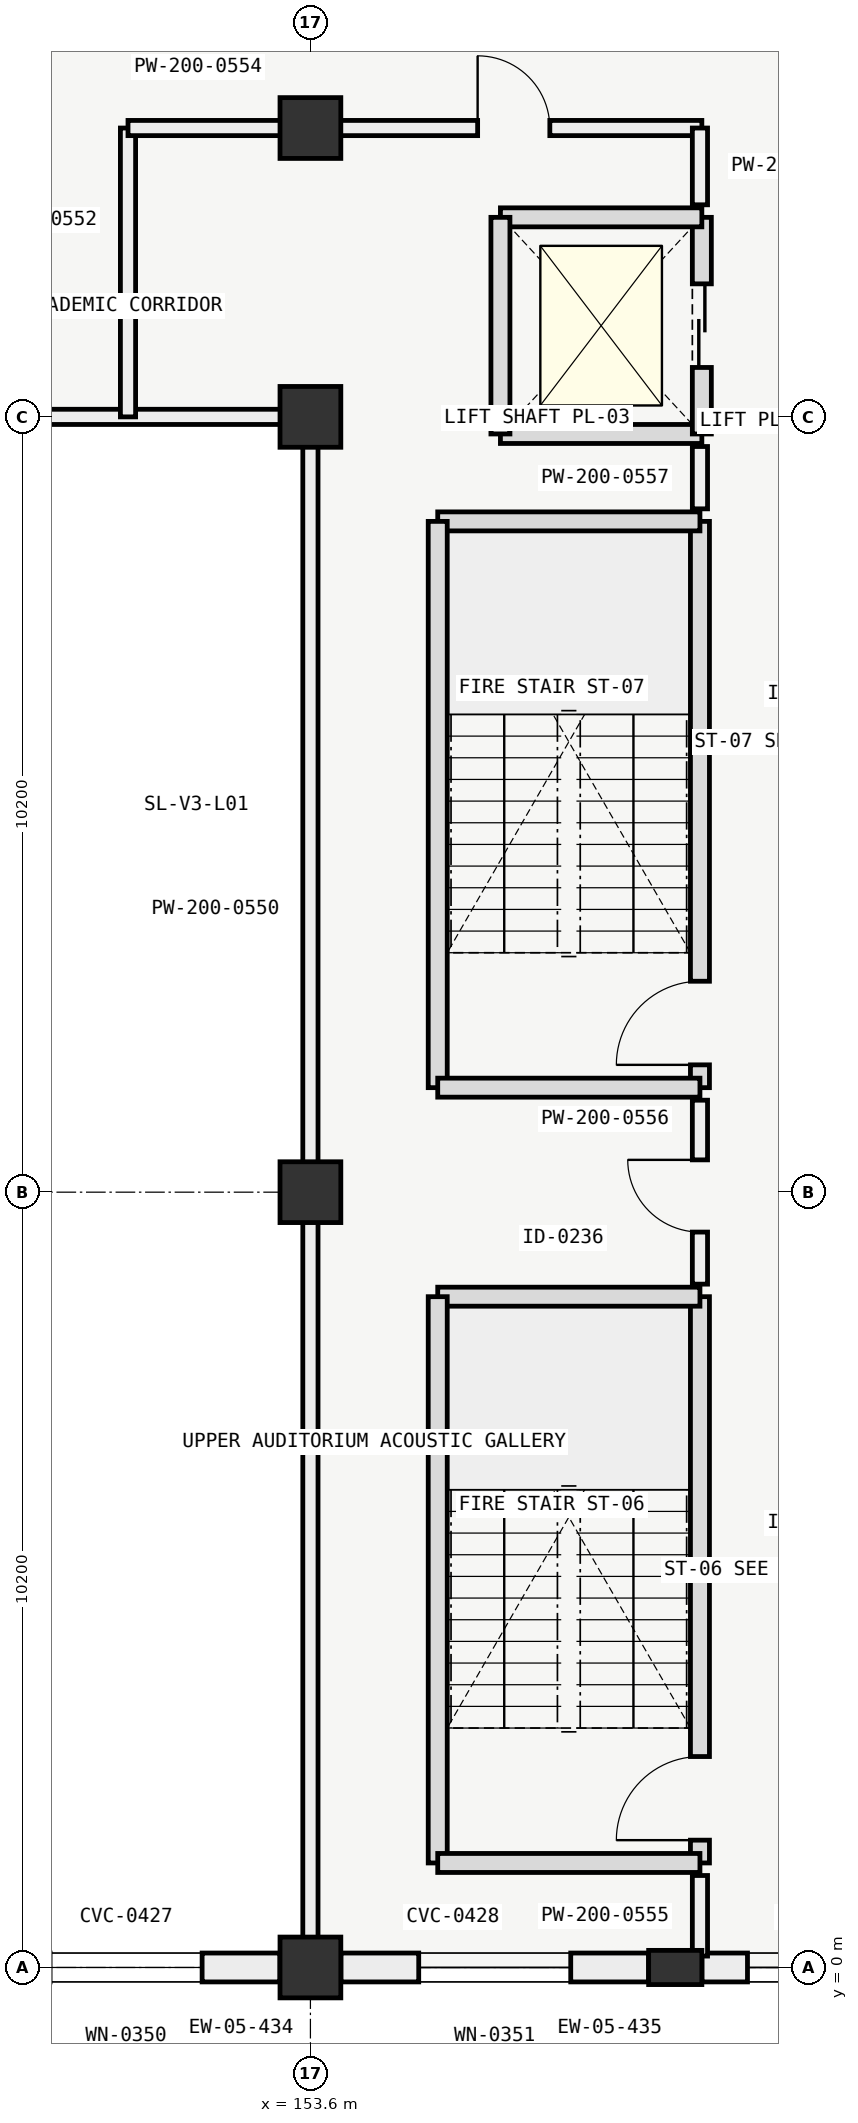
"""IFC4 building model, lengths in metres.
Left out: names, types, materials, properties, quantities, classifications, styles, units other than length and angle.
Written with IfcOpenShell. Run it as: python <this file> out.ifc"""

import sys

from ifc_helpers import new_model, si_unit, direction, frame, frame_2d, origin, origin_2d, place, context, subcontext, project, spatial, rectangle, extrude, element, fill, save


model = new_model("IFC4")
c1 = context("Model", 3, precision=1e-05, world=origin(), true_north=direction((0.0, 1.0)))
c2 = subcontext(c1, "Body", "Model", "MODEL_VIEW")
j1 = project(units=[si_unit("LENGTHUNIT", "METRE"), si_unit("PLANEANGLEUNIT", "RADIAN")], contexts=[c1])
p1 = place(None, origin())
s1 = spatial("IfcSite", under=j1, at=p1, CompositionType="ELEMENT")
p2 = place(p1, origin())
s2 = spatial("IfcBuilding", under=s1, at=p2, CompositionType="ELEMENT")
p3 = place(p2, frame((0.0, 0.0, 5.4)))
s3 = spatial("IfcBuildingStorey", under=s2, at=p3, CompositionType="ELEMENT", Elevation=5.4)
for number, where, z_axis, x_axis in (
    (1, (153.6, 0.0, 0.0), (0.0, 0.0, 1.0), (1.0, 0.0, 0.0)),
    (2, (153.6, 10.2, 0.0), (0.0, 0.0, 1.0), (1.0, 0.0, 0.0)),
    (3, (153.6, 20.4, 0.0), (0.0, 0.0, 1.0), (1.0, 0.0, 0.0)),
    (4, (153.6, 24.2, 0.0), (0.0, 0.0, 1.0), (1.0, 0.0, 0.0)),
):
    element("IfcColumn", number, at=place(p3, frame(where, z_axis=z_axis, x_axis=x_axis)), inside=s3, PredefinedType="COLUMN", context=c2, shape_type="SweptSolid", body=[
        extrude(rectangle(XDim=0.8, YDim=0.8, at=origin_2d()), origin(), (0.0, 0.0, 1.0), 4.2),
    ])
p4 = place(p3, frame((158.4, 0.0, 0.0), z_axis=(0.0, 0.0, 1.0), x_axis=(0.0, 1.0, 0.0)))
e5 = element("IfcColumn", 5, at=p4, inside=s3, PredefinedType="PILASTER", context=c2, shape_type="SweptSolid", body=[
    extrude(rectangle(XDim=0.45, YDim=0.7, at=origin_2d()), origin(), (0.0, 0.0, 1.0), 4.2),
])
p5 = place(p3, frame((153.199, 0.0, 0.0), z_axis=(0.0, 0.0, 1.0), x_axis=(-1.0, 0.0, 0.0)))
e6 = element("IfcWall", 6, at=p5, inside=s3, PredefinedType="SOLIDWALL", context=c2, shape_type="SweptSolid", body=[
    extrude(rectangle(XDim=4.048, YDim=0.38, at=frame_2d((2.024, 0.0))), origin(), (0.0, 0.0, 1.0), 3.25),
])
p6 = place(p5, frame((1.024, 0.0, 0.85)))
e7 = element("IfcOpeningElement", 7, at=p6, cuts=e6, PredefinedType="OPENING", context=c2, shape_type="SweptSolid", body=[
    extrude(rectangle(XDim=2.0, YDim=1.35, at=frame_2d((1.0, 0.675))), frame((0.0, 0.2, 0.0), z_axis=(0.0, -1.0, 0.0), x_axis=(1.0, 0.0, 0.0)), (0.0, 0.0, 1.0), 0.4),
])
p7 = place(p3, frame((158.049, 0.0, 0.0), z_axis=(0.0, 0.0, 1.0), x_axis=(-1.0, 0.0, 0.0)))
e8 = element("IfcWall", 8, at=p7, inside=s3, PredefinedType="SOLIDWALL", context=c2, shape_type="SweptSolid", body=[
    extrude(rectangle(XDim=4.048, YDim=0.38, at=frame_2d((2.024, 0.0))), origin(), (0.0, 0.0, 1.0), 3.25),
])
p8 = place(p7, frame((1.024, 0.0, 0.85)))
e9 = element("IfcOpeningElement", 9, at=p8, cuts=e8, PredefinedType="OPENING", context=c2, shape_type="SweptSolid", body=[
    extrude(rectangle(XDim=2.0, YDim=1.35, at=frame_2d((1.0, 0.675))), frame((0.0, 0.2, 0.0), z_axis=(0.0, -1.0, 0.0), x_axis=(1.0, 0.0, 0.0)), (0.0, 0.0, 1.0), 0.4),
])
p9 = place(p3, frame((161.95, 0.0, 0.0), z_axis=(0.0, 0.0, 1.0), x_axis=(-1.0, 0.0, 0.0)))
e10 = element("IfcWall", 10, at=p9, inside=s3, PredefinedType="SOLIDWALL", context=c2, shape_type="SweptSolid", body=[
    extrude(rectangle(XDim=3.199, YDim=0.38, at=frame_2d((1.6, 0.0))), origin(), (0.0, 0.0, 1.0), 3.25),
])
p10 = place(p9, frame((0.6, 0.0, 0.75)))
e11 = element("IfcOpeningElement", 11, at=p10, cuts=e10, PredefinedType="OPENING", context=c2, shape_type="SweptSolid", body=[
    extrude(rectangle(XDim=2.0, YDim=1.35, at=frame_2d((1.0, 0.675))), frame((0.0, 0.2, 0.0), z_axis=(0.0, -1.0, 0.0), x_axis=(1.0, 0.0, 0.0)), (0.0, 0.0, 1.0), 0.4),
])
p11 = place(p3, frame((158.725, 1.375, 0.0), z_axis=(0.0, 0.0, 1.0), x_axis=(0.0, 1.0, 0.0)))
e12 = element("IfcWall", 12, at=p11, inside=s3, PredefinedType="SOLIDWALL", context=c2, shape_type="SweptSolid", body=[
    extrude(rectangle(XDim=7.45, YDim=0.25, at=frame_2d((3.725, 0.0))), origin(), (0.0, 0.0, 1.0), 3.92),
])
p12 = place(p11, frame((0.3, 0.0, 0.0)))
e13 = element("IfcOpeningElement", 13, at=p12, cuts=e12, PredefinedType="OPENING", context=c2, shape_type="SweptSolid", body=[
    extrude(rectangle(XDim=1.1, YDim=2.2, at=frame_2d((0.55, 1.1))), frame((0.0, 0.135, 0.0), z_axis=(0.0, -1.0, 0.0), x_axis=(1.0, 0.0, 0.0)), (0.0, 0.0, 1.0), 0.27),
])
p13 = place(p3, frame((158.725, 8.825, 0.0), z_axis=(0.0, 0.0, 1.0), x_axis=(-1.0, 0.0, 0.0)))
e14 = element("IfcWall", 14, at=p13, inside=s3, PredefinedType="SOLIDWALL", context=c2, shape_type="SweptSolid", body=[
    extrude(rectangle(XDim=3.45, YDim=0.25, at=frame_2d((1.725, 0.0))), origin(), (0.0, 0.0, 1.0), 3.92),
])
p14 = place(p3, frame((155.275, 8.825, 0.0), z_axis=(0.0, 0.0, 1.0), x_axis=(0.0, -1.0, 0.0)))
e15 = element("IfcWall", 15, at=p14, inside=s3, PredefinedType="SOLIDWALL", context=c2, shape_type="SweptSolid", body=[
    extrude(rectangle(XDim=7.45, YDim=0.25, at=frame_2d((3.725, 0.0))), origin(), (0.0, 0.0, 1.0), 3.92),
])
p15 = place(p3, frame((155.275, 1.375, 0.0), z_axis=(0.0, 0.0, 1.0), x_axis=(1.0, 0.0, 0.0)))
e16 = element("IfcWall", 16, at=p15, inside=s3, PredefinedType="SOLIDWALL", context=c2, shape_type="SweptSolid", body=[
    extrude(rectangle(XDim=3.45, YDim=0.25, at=frame_2d((1.725, 0.0))), origin(), (0.0, 0.0, 1.0), 3.92),
])
p16 = place(p3, frame((158.725, 11.575, 0.0), z_axis=(0.0, 0.0, 1.0), x_axis=(0.0, 1.0, 0.0)))
e17 = element("IfcWall", 17, at=p16, inside=s3, PredefinedType="SOLIDWALL", context=c2, shape_type="SweptSolid", body=[
    extrude(rectangle(XDim=7.45, YDim=0.25, at=frame_2d((3.725, 0.0))), origin(), (0.0, 0.0, 1.0), 3.92),
])
p17 = place(p16, frame((0.3, 0.0, 0.0)))
e18 = element("IfcOpeningElement", 18, at=p17, cuts=e17, PredefinedType="OPENING", context=c2, shape_type="SweptSolid", body=[
    extrude(rectangle(XDim=1.1, YDim=2.2, at=frame_2d((0.55, 1.1))), frame((0.0, 0.135, 0.0), z_axis=(0.0, -1.0, 0.0), x_axis=(1.0, 0.0, 0.0)), (0.0, 0.0, 1.0), 0.27),
])
p18 = place(p3, frame((158.725, 19.025, 0.0), z_axis=(0.0, 0.0, 1.0), x_axis=(-1.0, 0.0, 0.0)))
e19 = element("IfcWall", 19, at=p18, inside=s3, PredefinedType="SOLIDWALL", context=c2, shape_type="SweptSolid", body=[
    extrude(rectangle(XDim=3.45, YDim=0.25, at=frame_2d((1.725, 0.0))), origin(), (0.0, 0.0, 1.0), 3.92),
])
p19 = place(p3, frame((155.275, 19.025, 0.0), z_axis=(0.0, 0.0, 1.0), x_axis=(0.0, -1.0, 0.0)))
e20 = element("IfcWall", 20, at=p19, inside=s3, PredefinedType="SOLIDWALL", context=c2, shape_type="SweptSolid", body=[
    extrude(rectangle(XDim=7.45, YDim=0.25, at=frame_2d((3.725, 0.0))), origin(), (0.0, 0.0, 1.0), 3.92),
])
p20 = place(p3, frame((155.275, 11.575, 0.0), z_axis=(0.0, 0.0, 1.0), x_axis=(1.0, 0.0, 0.0)))
e21 = element("IfcWall", 21, at=p20, inside=s3, PredefinedType="SOLIDWALL", context=c2, shape_type="SweptSolid", body=[
    extrude(rectangle(XDim=3.45, YDim=0.25, at=frame_2d((1.725, 0.0))), origin(), (0.0, 0.0, 1.0), 3.92),
])
p21 = place(p3, frame((156.1, 20.175, 0.0), z_axis=(0.0, 0.0, 1.0), x_axis=(1.0, 0.0, 0.0)))
e22 = element("IfcWall", 22, at=p21, inside=s3, PredefinedType="SOLIDWALL", context=c2, shape_type="SweptSolid", body=[
    extrude(rectangle(XDim=2.65, YDim=0.25, at=frame_2d((1.325, 0.0))), origin(), (0.0, 0.0, 1.0), 3.92),
])
p22 = place(p3, frame((158.75, 20.175, 0.0), z_axis=(0.0, 0.0, 1.0), x_axis=(0.0, 1.0, 0.0)))
e23 = element("IfcWall", 23, at=p22, inside=s3, PredefinedType="SOLIDWALL", context=c2, shape_type="SweptSolid", body=[
    extrude(rectangle(XDim=2.85, YDim=0.25, at=frame_2d((1.425, 0.0))), origin(), (0.0, 0.0, 1.0), 3.92),
])
p23 = place(p22, frame((0.875, 0.0, 0.0)))
e24 = element("IfcOpeningElement", 24, at=p23, cuts=e23, PredefinedType="OPENING", context=c2, shape_type="SweptSolid", body=[
    extrude(rectangle(XDim=1.1, YDim=2.1, at=frame_2d((0.55, 1.05))), frame((0.0, 0.135, 0.0), z_axis=(0.0, -1.0, 0.0), x_axis=(1.0, 0.0, 0.0)), (0.0, 0.0, 1.0), 0.27),
])
p24 = place(p3, frame((158.75, 23.025, 0.0), z_axis=(0.0, 0.0, 1.0), x_axis=(-1.0, 0.0, 0.0)))
e25 = element("IfcWall", 25, at=p24, inside=s3, PredefinedType="SOLIDWALL", context=c2, shape_type="SweptSolid", body=[
    extrude(rectangle(XDim=2.65, YDim=0.25, at=frame_2d((1.325, 0.0))), origin(), (0.0, 0.0, 1.0), 3.92),
])
p25 = place(p3, frame((156.1, 23.025, 0.0), z_axis=(0.0, 0.0, 1.0), x_axis=(0.0, -1.0, 0.0)))
e26 = element("IfcWall", 26, at=p25, inside=s3, PredefinedType="SOLIDWALL", context=c2, shape_type="SweptSolid", body=[
    extrude(rectangle(XDim=2.85, YDim=0.25, at=frame_2d((1.425, 0.0))), origin(), (0.0, 0.0, 1.0), 3.92),
])
p26 = place(p3, frame((134.55, 20.4, 0.0), z_axis=(0.0, 0.0, 1.0), x_axis=(1.0, 0.0, 0.0)))
e27 = element("IfcWall", 27, at=p26, inside=s3, PredefinedType="PARTITIONING", context=c2, shape_type="SweptSolid", body=[
    extrude(rectangle(XDim=19.05, YDim=0.2, at=frame_2d((9.525, 0.0))), origin(), (0.0, 0.0, 1.0), 3.2),
])
p27 = place(p3, frame((153.6, 0.15, 0.0), z_axis=(0.0, 0.0, 1.0), x_axis=(0.0, 1.0, 0.0)))
e28 = element("IfcWall", 28, at=p27, inside=s3, PredefinedType="PARTITIONING", context=c2, shape_type="SweptSolid", body=[
    extrude(rectangle(XDim=20.25, YDim=0.2, at=frame_2d((10.125, 0.0))), origin(), (0.0, 0.0, 1.0), 3.15),
])
p28 = place(p3, frame((151.2, 20.4, 0.0), z_axis=(0.0, 0.0, 1.0), x_axis=(0.0, 1.0, 0.0)))
e29 = element("IfcWall", 29, at=p28, inside=s3, PredefinedType="PARTITIONING", context=c2, shape_type="SweptSolid", body=[
    extrude(rectangle(XDim=3.8, YDim=0.2, at=frame_2d((1.9, 0.0))), origin(), (0.0, 0.0, 1.0), 3.2),
])
p29 = place(p3, frame((151.2, 24.2, 0.0), z_axis=(0.0, 0.0, 1.0), x_axis=(1.0, 0.0, 0.0)))
e30 = element("IfcWall", 30, at=p29, inside=s3, PredefinedType="PARTITIONING", context=c2, shape_type="SweptSolid", body=[
    extrude(rectangle(XDim=7.55, YDim=0.2, at=frame_2d((3.775, 0.0))), origin(), (0.0, 0.0, 1.0), 3.25),
])
p30 = place(p29, frame((4.6, 0.0, 0.0)))
e31 = element("IfcOpeningElement", 31, at=p30, cuts=e30, PredefinedType="OPENING", context=c2, shape_type="SweptSolid", body=[
    extrude(rectangle(XDim=0.95, YDim=2.1, at=frame_2d((0.475, 1.05))), frame((0.0, 0.11, 0.0), z_axis=(0.0, -1.0, 0.0), x_axis=(1.0, 0.0, 0.0)), (0.0, 0.0, 1.0), 0.22),
])
p31 = place(p3, frame((158.725, 0.15, 0.0), z_axis=(0.0, 0.0, 1.0), x_axis=(0.0, 1.0, 0.0)))
e32 = element("IfcWall", 32, at=p31, inside=s3, PredefinedType="PARTITIONING", context=c2, shape_type="SweptSolid", body=[
    extrude(rectangle(XDim=1.06, YDim=0.2, at=frame_2d((0.53, 0.0))), origin(), (0.0, 0.0, 1.0), 3.85),
])
p32 = place(p3, frame((158.725, 8.99, 0.0), z_axis=(0.0, 0.0, 1.0), x_axis=(0.0, 1.0, 0.0)))
e33 = element("IfcWall", 33, at=p32, inside=s3, PredefinedType="PARTITIONING", context=c2, shape_type="SweptSolid", body=[
    extrude(rectangle(XDim=2.42, YDim=0.2, at=frame_2d((1.21, 0.0))), origin(), (0.0, 0.0, 1.0), 3.15),
])
p33 = place(p32, frame((0.685, 0.0, 0.0)))
e34 = element("IfcOpeningElement", 34, at=p33, cuts=e33, PredefinedType="OPENING", context=c2, shape_type="SweptSolid", body=[
    extrude(rectangle(XDim=0.95, YDim=2.1, at=frame_2d((0.475, 1.05))), frame((0.0, 0.11, 0.0), z_axis=(0.0, -1.0, 0.0), x_axis=(1.0, 0.0, 0.0)), (0.0, 0.0, 1.0), 0.22),
])
p34 = place(p3, frame((158.725, 19.19, 0.0), z_axis=(0.0, 0.0, 1.0), x_axis=(0.0, 1.0, 0.0)))
e35 = element("IfcWall", 35, at=p34, inside=s3, PredefinedType="PARTITIONING", context=c2, shape_type="SweptSolid", body=[
    extrude(rectangle(XDim=0.82, YDim=0.2, at=frame_2d((0.41, 0.0))), origin(), (0.0, 0.0, 1.0), 3.85),
])
p35 = place(p3, frame((158.725, 23.19, 0.0), z_axis=(0.0, 0.0, 1.0), x_axis=(0.0, 1.0, 0.0)))
e36 = element("IfcWall", 36, at=p35, inside=s3, PredefinedType="PARTITIONING", context=c2, shape_type="SweptSolid", body=[
    extrude(rectangle(XDim=1.01, YDim=0.2, at=frame_2d((0.505, 0.0))), origin(), (0.0, 0.0, 1.0), 3.85),
])
p36 = place(p6, origin())
e37 = element("IfcWindow", 37, at=p36, inside=s3, PartitioningType="SINGLE_PANEL", PredefinedType="WINDOW", context=c2, shape_type="SweptSolid", body=[
    extrude(rectangle(XDim=2.0, YDim=1.35, at=frame_2d((1.0, 0.675))), frame((0.0, 0.03, 0.0), z_axis=(0.0, -1.0, 0.0), x_axis=(1.0, 0.0, 0.0)), (0.0, 0.0, 1.0), 0.06),
])
fill(e7, e37)
p37 = place(p8, origin())
e38 = element("IfcWindow", 38, at=p37, inside=s3, PartitioningType="SINGLE_PANEL", PredefinedType="WINDOW", context=c2, shape_type="SweptSolid", body=[
    extrude(rectangle(XDim=2.0, YDim=1.35, at=frame_2d((1.0, 0.675))), frame((0.0, 0.03, 0.0), z_axis=(0.0, -1.0, 0.0), x_axis=(1.0, 0.0, 0.0)), (0.0, 0.0, 1.0), 0.06),
])
fill(e9, e38)
p38 = place(p10, origin())
e39 = element("IfcWindow", 39, at=p38, inside=s3, PartitioningType="SINGLE_PANEL", PredefinedType="WINDOW", context=c2, shape_type="SweptSolid", body=[
    extrude(rectangle(XDim=2.0, YDim=1.35, at=frame_2d((1.0, 0.675))), frame((0.0, 0.03, 0.0), z_axis=(0.0, -1.0, 0.0), x_axis=(1.0, 0.0, 0.0)), (0.0, 0.0, 1.0), 0.06),
])
fill(e11, e39)
p39 = place(p12, origin())
e40 = element("IfcDoor", 40, at=p39, inside=s3, OperationType="SINGLE_SWING_LEFT", PredefinedType="DOOR", context=c2, shape_type="SweptSolid", body=[
    extrude(rectangle(XDim=1.1, YDim=2.2, at=frame_2d((0.55, 1.1))), frame((0.0, 0.025, 0.0), z_axis=(0.0, -1.0, 0.0), x_axis=(1.0, 0.0, 0.0)), (0.0, 0.0, 1.0), 0.05),
])
fill(e13, e40)
p40 = place(p17, origin())
e41 = element("IfcDoor", 41, at=p40, inside=s3, OperationType="SINGLE_SWING_LEFT", PredefinedType="DOOR", context=c2, shape_type="SweptSolid", body=[
    extrude(rectangle(XDim=1.1, YDim=2.2, at=frame_2d((0.55, 1.1))), frame((0.0, 0.025, 0.0), z_axis=(0.0, -1.0, 0.0), x_axis=(1.0, 0.0, 0.0)), (0.0, 0.0, 1.0), 0.05),
])
fill(e18, e41)
p41 = place(p23, origin())
e42 = element("IfcDoor", 42, at=p41, inside=s3, OperationType="SLIDING_TO_LEFT", PredefinedType="DOOR", context=c2, shape_type="SweptSolid", body=[
    extrude(rectangle(XDim=1.1, YDim=2.1, at=frame_2d((0.55, 1.05))), frame((0.0, 0.025, 0.0), z_axis=(0.0, -1.0, 0.0), x_axis=(1.0, 0.0, 0.0)), (0.0, 0.0, 1.0), 0.05),
])
fill(e24, e42)
p42 = place(p30, origin())
e43 = element("IfcDoor", 43, at=p42, inside=s3, OperationType="SINGLE_SWING_LEFT", PredefinedType="DOOR", context=c2, shape_type="SweptSolid", body=[
    extrude(rectangle(XDim=0.95, YDim=2.1, at=frame_2d((0.475, 1.05))), frame((0.0, 0.025, 0.0), z_axis=(0.0, -1.0, 0.0), x_axis=(1.0, 0.0, 0.0)), (0.0, 0.0, 1.0), 0.05),
])
fill(e31, e43)
p43 = place(p33, origin())
e44 = element("IfcDoor", 44, at=p43, inside=s3, OperationType="SINGLE_SWING_RIGHT", PredefinedType="DOOR", context=c2, shape_type="SweptSolid", body=[
    extrude(rectangle(XDim=0.95, YDim=2.1, at=frame_2d((0.475, 1.05))), frame((0.0, 0.025, 0.0), z_axis=(0.0, -1.0, 0.0), x_axis=(1.0, 0.0, 0.0)), (0.0, 0.0, 1.0), 0.05),
])
fill(e34, e44)
save(model, sys.argv[1])
